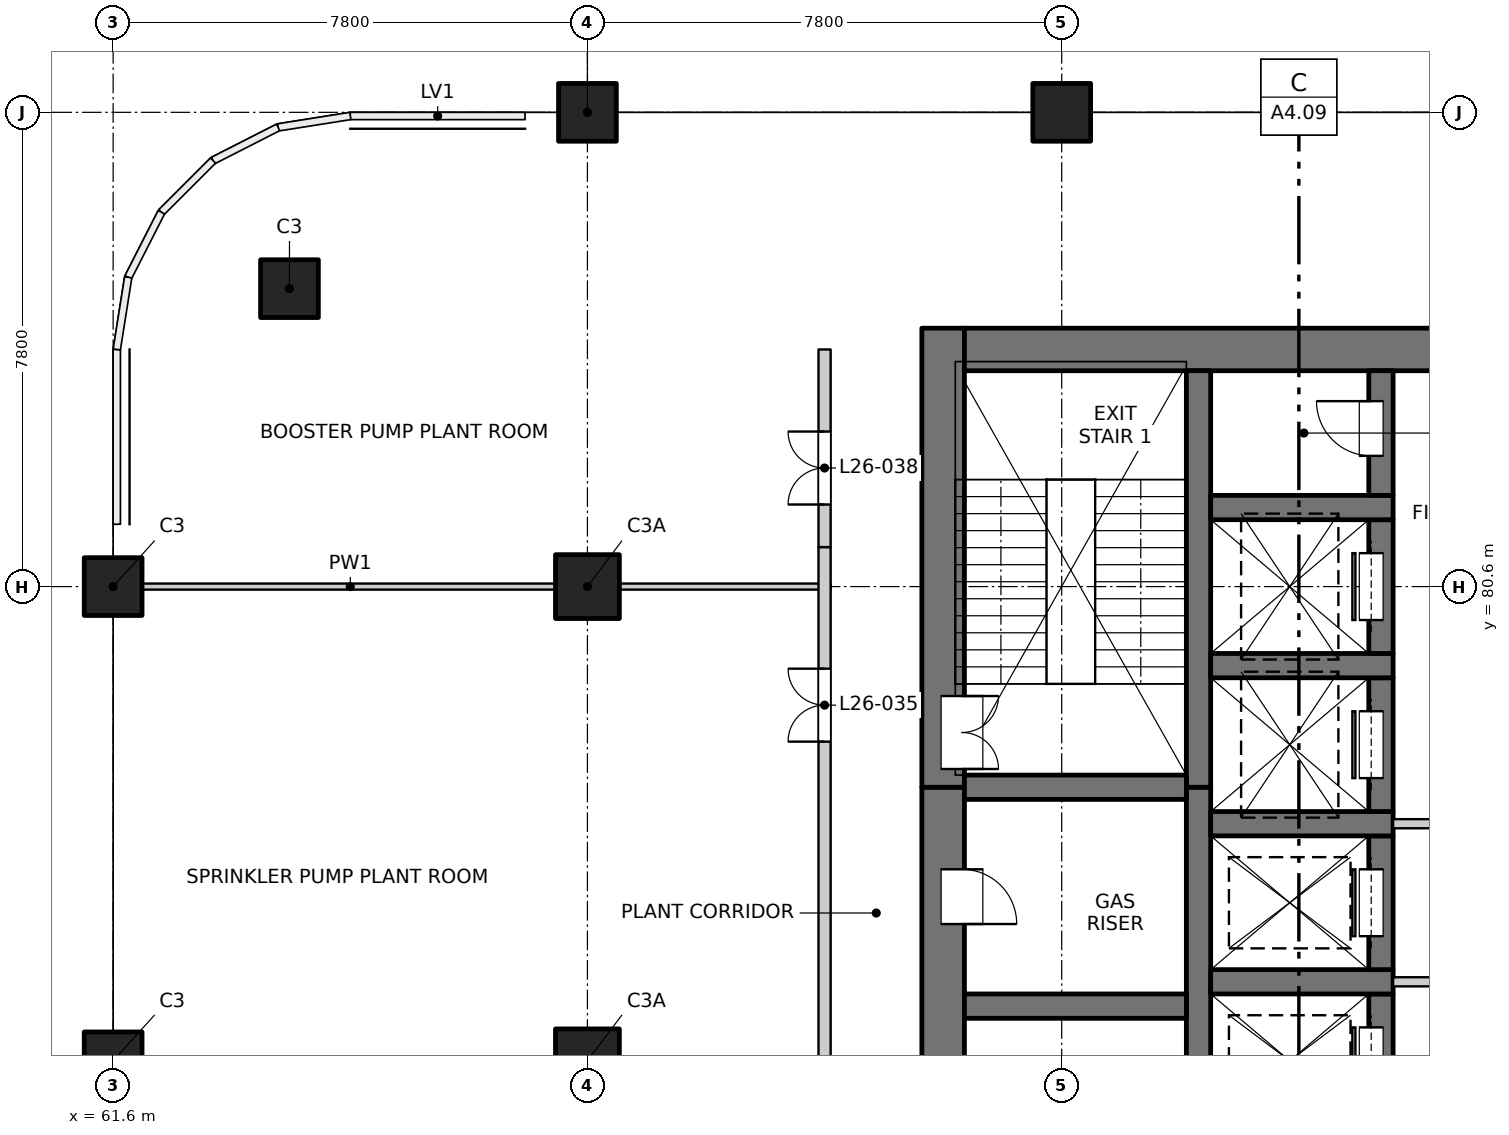
"""IFC4 building model, lengths in metres.
Left out: names, types, materials, properties, quantities, classifications, styles, units other than length and angle.
Written with IfcOpenShell. Run it as: python <this file> out.ifc"""

import sys

from ifc_helpers import new_model, si_unit, direction, frame, frame_2d, origin, origin_2d, place, context, subcontext, project, spatial, rectangle, extrude, element, fill, save


model = new_model("IFC4")
c1 = context("Model", 3, precision=1e-05, world=origin(), true_north=direction((0.0, 1.0)))
c2 = subcontext(c1, "Body", "Model", "MODEL_VIEW")
j1 = project(units=[si_unit("LENGTHUNIT", "METRE"), si_unit("PLANEANGLEUNIT", "RADIAN")], contexts=[c1])
p1 = place(None, origin())
s1 = spatial("IfcSite", under=j1, at=p1, CompositionType="ELEMENT")
p2 = place(p1, origin())
s2 = spatial("IfcBuilding", under=s1, at=p2, CompositionType="ELEMENT")
p3 = place(p2, frame((0.0, 0.0, 95.4)))
s3 = spatial("IfcBuildingStorey", under=s2, at=p3, CompositionType="ELEMENT", Elevation=95.4)
for number, where, z_axis, x_axis in (
    (1, (64.5, 85.5, -0.3), (0.0, 0.0, 1.0), (1.0, 0.0, 0.0)),
    (2, (69.4, 88.4, -0.3), (0.0, 0.0, 1.0), (1.0, 0.0, 0.0)),
    (3, (77.2, 88.4, -0.3), (0.0, 0.0, 1.0), (1.0, 0.0, 0.0)),
    (4, (61.6, 72.8, -0.3), (0.0, 0.0, 1.0), (1.0, 0.0, 0.0)),
    (5, (61.6, 80.6, -0.3), (0.0, 0.0, 1.0), (1.0, 0.0, 0.0)),
):
    element("IfcColumn", number, at=place(p3, frame(where, z_axis=z_axis, x_axis=x_axis)), inside=s3, PredefinedType="COLUMN", context=c2, shape_type="SweptSolid", body=[
        extrude(rectangle(XDim=0.95, YDim=0.95, at=origin_2d()), origin(), (0.0, 0.0, 1.0), 2.9),
    ])
for number, where, z_axis, x_axis in (
    (6, (69.4, 72.8, -0.3), (0.0, 0.0, 1.0), (1.0, 0.0, 0.0)),
    (7, (69.4, 80.6, -0.3), (0.0, 0.0, 1.0), (1.0, 0.0, 0.0)),
):
    element("IfcColumn", number, at=place(p3, frame(where, z_axis=z_axis, x_axis=x_axis)), inside=s3, PredefinedType="COLUMN", context=c2, shape_type="SweptSolid", body=[
        extrude(rectangle(XDim=1.05, YDim=1.05, at=origin_2d()), origin(), (0.0, 0.0, 1.0), 2.9),
    ])
p4 = place(p3, frame((75.25, 54.9, -0.3), z_axis=(0.0, 0.0, 1.0), x_axis=(0.0, 1.0, 0.0)))
e8 = element("IfcWall", 8, at=p4, inside=s3, PredefinedType="SOLIDWALL", context=c2, shape_type="SweptSolid", body=[
    extrude(rectangle(XDim=22.4, YDim=0.7, at=frame_2d((11.2, 0.0))), origin(), (0.0, 0.0, 1.0), 4.5),
])
p5 = place(p4, frame((7.55, 0.0, 0.3)))
e9 = element("IfcOpeningElement", 9, at=p5, cuts=e8, PredefinedType="OPENING", context=c2, shape_type="SweptSolid", body=[
    extrude(rectangle(XDim=0.9, YDim=2.1, at=frame_2d((0.45, 1.05))), frame((0.0, 0.36, 0.0), z_axis=(0.0, -1.0, 0.0), x_axis=(1.0, 0.0, 0.0)), (0.0, 0.0, 1.0), 0.72),
])
p6 = place(p4, frame((10.85, 0.0, 0.3)))
e10 = element("IfcOpeningElement", 10, at=p6, cuts=e8, PredefinedType="OPENING", context=c2, shape_type="SweptSolid", body=[
    extrude(rectangle(XDim=0.9, YDim=2.1, at=frame_2d((0.45, 1.05))), frame((0.0, 0.36, 0.0), z_axis=(0.0, -1.0, 0.0), x_axis=(1.0, 0.0, 0.0)), (0.0, 0.0, 1.0), 0.72),
])
p7 = place(p4, frame((15.35, 0.0, 0.3)))
e11 = element("IfcOpeningElement", 11, at=p7, cuts=e8, PredefinedType="OPENING", context=c2, shape_type="SweptSolid", body=[
    extrude(rectangle(XDim=0.9, YDim=2.1, at=frame_2d((0.45, 1.05))), frame((0.0, 0.36, 0.0), z_axis=(0.0, -1.0, 0.0), x_axis=(1.0, 0.0, 0.0)), (0.0, 0.0, 1.0), 0.72),
])
p8 = place(p4, frame((20.15, 0.0, 0.3)))
e12 = element("IfcOpeningElement", 12, at=p8, cuts=e8, PredefinedType="OPENING", context=c2, shape_type="SweptSolid", body=[
    extrude(rectangle(XDim=0.9, YDim=2.1, at=frame_2d((0.45, 1.05))), frame((0.0, 0.36, 0.0), z_axis=(0.0, -1.0, 0.0), x_axis=(1.0, 0.0, 0.0)), (0.0, 0.0, 1.0), 0.72),
])
p9 = place(p3, frame((75.25, 77.3, -0.3), z_axis=(0.0, 0.0, 1.0), x_axis=(0.0, 1.0, 0.0)))
e13 = element("IfcWall", 13, at=p9, inside=s3, PredefinedType="SOLIDWALL", context=c2, shape_type="SweptSolid", body=[
    extrude(rectangle(XDim=7.55, YDim=0.7, at=frame_2d((3.775, 0.0))), origin(), (0.0, 0.0, 1.0), 4.5),
])
p10 = place(p9, frame((0.3, 0.0, 0.3)))
e14 = element("IfcOpeningElement", 14, at=p10, cuts=e13, PredefinedType="OPENING", context=c2, shape_type="SweptSolid", body=[
    extrude(rectangle(XDim=1.2, YDim=2.1, at=frame_2d((0.6, 1.05))), frame((0.0, 0.36, 0.0), z_axis=(0.0, -1.0, 0.0), x_axis=(1.0, 0.0, 0.0)), (0.0, 0.0, 1.0), 0.72),
])
p11 = place(p3, frame((75.6, 84.5, -0.3), z_axis=(0.0, 0.0, 1.0), x_axis=(1.0, 0.0, 0.0)))
e15 = element("IfcWall", 15, at=p11, inside=s3, PredefinedType="SOLIDWALL", context=c2, shape_type="SweptSolid", body=[
    extrude(rectangle(XDim=18.8, YDim=0.7, at=frame_2d((9.4, 0.0))), origin(), (0.0, 0.0, 1.0), 4.5),
])
p12 = place(p3, frame((79.45, 60.9, -0.3), z_axis=(0.0, 0.0, 1.0), x_axis=(0.0, 1.0, 0.0)))
e16 = element("IfcWall", 16, at=p12, inside=s3, PredefinedType="SOLIDWALL", context=c2, shape_type="SweptSolid", body=[
    extrude(rectangle(XDim=16.4, YDim=0.4, at=frame_2d((8.2, 0.0))), origin(), (0.0, 0.0, 1.0), 4.5),
])
p13 = place(p3, frame((79.45, 77.3, -0.3), z_axis=(0.0, 0.0, 1.0), x_axis=(0.0, 1.0, 0.0)))
e17 = element("IfcWall", 17, at=p13, inside=s3, PredefinedType="SOLIDWALL", context=c2, shape_type="SweptSolid", body=[
    extrude(rectangle(XDim=6.85, YDim=0.4, at=frame_2d((3.425, 0.0))), origin(), (0.0, 0.0, 1.0), 4.5),
])
p14 = place(p3, frame((82.45, 71.7, -0.3), z_axis=(0.0, 0.0, 1.0), x_axis=(0.0, 1.0, 0.0)))
e18 = element("IfcWall", 18, at=p14, inside=s3, PredefinedType="SOLIDWALL", context=c2, shape_type="SweptSolid", body=[
    extrude(rectangle(XDim=2.2, YDim=0.4, at=frame_2d((1.1, 0.0))), origin(), (0.0, 0.0, 1.0), 4.5),
])
p15 = place(p14, frame((0.55, 0.0, 0.3)))
e19 = element("IfcOpeningElement", 19, at=p15, cuts=e18, PredefinedType="OPENING", context=c2, shape_type="SweptSolid", body=[
    extrude(rectangle(XDim=1.1, YDim=2.1, at=frame_2d((0.55, 1.05))), frame((0.0, 0.21, 0.0), z_axis=(0.0, -1.0, 0.0), x_axis=(1.0, 0.0, 0.0)), (0.0, 0.0, 1.0), 0.42),
])
p16 = place(p3, frame((79.65, 74.1, -0.3), z_axis=(0.0, 0.0, 1.0), x_axis=(1.0, 0.0, 0.0)))
e20 = element("IfcWall", 20, at=p16, inside=s3, PredefinedType="SOLIDWALL", context=c2, shape_type="SweptSolid", body=[
    extrude(rectangle(XDim=3.0, YDim=0.4, at=frame_2d((1.5, 0.0))), origin(), (0.0, 0.0, 1.0), 4.5),
])
p17 = place(p3, frame((82.45, 74.3, -0.3), z_axis=(0.0, 0.0, 1.0), x_axis=(0.0, 1.0, 0.0)))
e21 = element("IfcWall", 21, at=p17, inside=s3, PredefinedType="SOLIDWALL", context=c2, shape_type="SweptSolid", body=[
    extrude(rectangle(XDim=2.2, YDim=0.4, at=frame_2d((1.1, 0.0))), origin(), (0.0, 0.0, 1.0), 4.5),
])
p18 = place(p17, frame((0.55, 0.0, 0.3)))
e22 = element("IfcOpeningElement", 22, at=p18, cuts=e21, PredefinedType="OPENING", context=c2, shape_type="SweptSolid", body=[
    extrude(rectangle(XDim=1.1, YDim=2.1, at=frame_2d((0.55, 1.05))), frame((0.0, 0.21, 0.0), z_axis=(0.0, -1.0, 0.0), x_axis=(1.0, 0.0, 0.0)), (0.0, 0.0, 1.0), 0.42),
])
p19 = place(p3, frame((79.65, 76.7, -0.3), z_axis=(0.0, 0.0, 1.0), x_axis=(1.0, 0.0, 0.0)))
e23 = element("IfcWall", 23, at=p19, inside=s3, PredefinedType="SOLIDWALL", context=c2, shape_type="SweptSolid", body=[
    extrude(rectangle(XDim=3.0, YDim=0.4, at=frame_2d((1.5, 0.0))), origin(), (0.0, 0.0, 1.0), 4.5),
])
p20 = place(p3, frame((82.45, 76.9, -0.3), z_axis=(0.0, 0.0, 1.0), x_axis=(0.0, 1.0, 0.0)))
e24 = element("IfcWall", 24, at=p20, inside=s3, PredefinedType="SOLIDWALL", context=c2, shape_type="SweptSolid", body=[
    extrude(rectangle(XDim=2.2, YDim=0.4, at=frame_2d((1.1, 0.0))), origin(), (0.0, 0.0, 1.0), 4.5),
])
p21 = place(p20, frame((0.55, 0.0, 0.3)))
e25 = element("IfcOpeningElement", 25, at=p21, cuts=e24, PredefinedType="OPENING", context=c2, shape_type="SweptSolid", body=[
    extrude(rectangle(XDim=1.1, YDim=2.1, at=frame_2d((0.55, 1.05))), frame((0.0, 0.21, 0.0), z_axis=(0.0, -1.0, 0.0), x_axis=(1.0, 0.0, 0.0)), (0.0, 0.0, 1.0), 0.42),
])
p22 = place(p3, frame((79.65, 79.3, -0.3), z_axis=(0.0, 0.0, 1.0), x_axis=(1.0, 0.0, 0.0)))
e26 = element("IfcWall", 26, at=p22, inside=s3, PredefinedType="SOLIDWALL", context=c2, shape_type="SweptSolid", body=[
    extrude(rectangle(XDim=3.0, YDim=0.4, at=frame_2d((1.5, 0.0))), origin(), (0.0, 0.0, 1.0), 4.5),
])
p23 = place(p3, frame((82.45, 79.5, -0.3), z_axis=(0.0, 0.0, 1.0), x_axis=(0.0, 1.0, 0.0)))
e27 = element("IfcWall", 27, at=p23, inside=s3, PredefinedType="SOLIDWALL", context=c2, shape_type="SweptSolid", body=[
    extrude(rectangle(XDim=2.2, YDim=0.4, at=frame_2d((1.1, 0.0))), origin(), (0.0, 0.0, 1.0), 4.5),
])
p24 = place(p23, frame((0.55, 0.0, 0.3)))
e28 = element("IfcOpeningElement", 28, at=p24, cuts=e27, PredefinedType="OPENING", context=c2, shape_type="SweptSolid", body=[
    extrude(rectangle(XDim=1.1, YDim=2.1, at=frame_2d((0.55, 1.05))), frame((0.0, 0.21, 0.0), z_axis=(0.0, -1.0, 0.0), x_axis=(1.0, 0.0, 0.0)), (0.0, 0.0, 1.0), 0.42),
])
p25 = place(p3, frame((79.65, 81.9, -0.3), z_axis=(0.0, 0.0, 1.0), x_axis=(1.0, 0.0, 0.0)))
e29 = element("IfcWall", 29, at=p25, inside=s3, PredefinedType="SOLIDWALL", context=c2, shape_type="SweptSolid", body=[
    extrude(rectangle(XDim=3.0, YDim=0.4, at=frame_2d((1.5, 0.0))), origin(), (0.0, 0.0, 1.0), 4.5),
])
p26 = place(p3, frame((82.45, 82.1, -0.3), z_axis=(0.0, 0.0, 1.0), x_axis=(0.0, 1.0, 0.0)))
e30 = element("IfcWall", 30, at=p26, inside=s3, PredefinedType="SOLIDWALL", context=c2, shape_type="SweptSolid", body=[
    extrude(rectangle(XDim=2.05, YDim=0.4, at=frame_2d((1.025, 0.0))), origin(), (0.0, 0.0, 1.0), 4.5),
])
p27 = place(p26, frame((0.65, 0.0, 0.3)))
e31 = element("IfcOpeningElement", 31, at=p27, cuts=e30, PredefinedType="OPENING", context=c2, shape_type="SweptSolid", body=[
    extrude(rectangle(XDim=0.9, YDim=2.1, at=frame_2d((0.45, 1.05))), frame((0.0, 0.21, 0.0), z_axis=(0.0, -1.0, 0.0), x_axis=(1.0, 0.0, 0.0)), (0.0, 0.0, 1.0), 0.42),
])
for number, where, z_axis, x_axis in (
    (32, (75.6, 73.7, -0.3), (0.0, 0.0, 1.0), (1.0, 0.0, 0.0)),
    (33, (75.6, 77.3, -0.3), (0.0, 0.0, 1.0), (1.0, 0.0, 0.0)),
):
    element("IfcWall", number, at=place(p3, frame(where, z_axis=z_axis, x_axis=x_axis)), inside=s3, PredefinedType="SOLIDWALL", context=c2, shape_type="SweptSolid", body=[
        extrude(rectangle(XDim=3.65, YDim=0.4, at=frame_2d((1.825, 0.0))), origin(), (0.0, 0.0, 1.0), 4.5),
    ])
p28 = place(p3, frame((82.65, 74.1, 0.0), z_axis=(0.0, 0.0, 1.0), x_axis=(1.0, 0.0, 0.0)))
e34 = element("IfcWall", 34, at=p28, inside=s3, PredefinedType="PARTITIONING", context=c2, shape_type="SweptSolid", body=[
    extrude(rectangle(XDim=4.7, YDim=0.15, at=frame_2d((2.35, 0.0))), origin(), (0.0, 0.0, 1.0), 4.2),
])
p29 = place(p28, frame((1.45, 0.0, 0.0)))
e35 = element("IfcOpeningElement", 35, at=p29, cuts=e34, PredefinedType="OPENING", context=c2, shape_type="SweptSolid", body=[
    extrude(rectangle(XDim=1.8, YDim=2.1, at=frame_2d((0.9, 1.05))), frame((0.0, 0.085, 0.0), z_axis=(0.0, -1.0, 0.0), x_axis=(1.0, 0.0, 0.0)), (0.0, 0.0, 1.0), 0.17),
])
p30 = place(p3, frame((82.65, 76.7, 0.0), z_axis=(0.0, 0.0, 1.0), x_axis=(1.0, 0.0, 0.0)))
e36 = element("IfcWall", 36, at=p30, inside=s3, PredefinedType="PARTITIONING", context=c2, shape_type="SweptSolid", body=[
    extrude(rectangle(XDim=4.7, YDim=0.15, at=frame_2d((2.35, 0.0))), origin(), (0.0, 0.0, 1.0), 4.2),
])
p31 = place(p30, frame((1.45, 0.0, 0.0)))
e37 = element("IfcOpeningElement", 37, at=p31, cuts=e36, PredefinedType="OPENING", context=c2, shape_type="SweptSolid", body=[
    extrude(rectangle(XDim=1.8, YDim=2.1, at=frame_2d((0.9, 1.05))), frame((0.0, 0.085, 0.0), z_axis=(0.0, -1.0, 0.0), x_axis=(1.0, 0.0, 0.0)), (0.0, 0.0, 1.0), 0.17),
])
p32 = place(p3, frame((61.6, 80.6, 0.0), z_axis=(0.0, 0.0, 1.0), x_axis=(1.0, 0.0, 0.0)))
e38 = element("IfcWall", 38, at=p32, inside=s3, PredefinedType="PARTITIONING", context=c2, shape_type="SweptSolid", body=[
    extrude(rectangle(XDim=7.8, YDim=0.1, at=frame_2d((3.9, 0.0))), origin(), (0.0, 0.0, 1.0), 4.2),
])
p33 = place(p3, frame((69.4, 80.6, 0.0), z_axis=(0.0, 0.0, 1.0), x_axis=(1.0, 0.0, 0.0)))
e39 = element("IfcWall", 39, at=p33, inside=s3, PredefinedType="PARTITIONING", context=c2, shape_type="SweptSolid", body=[
    extrude(rectangle(XDim=4.0, YDim=0.1, at=frame_2d((2.0, 0.0))), origin(), (0.0, 0.0, 1.0), 2.6),
])
p34 = place(p3, frame((73.3, 55.35, 0.0), z_axis=(0.0, 0.0, 1.0), x_axis=(0.0, 1.0, 0.0)))
e40 = element("IfcWall", 40, at=p34, inside=s3, PredefinedType="PARTITIONING", context=c2, shape_type="SweptSolid", body=[
    extrude(rectangle(XDim=25.9, YDim=0.2, at=frame_2d((12.95, 0.0))), origin(), (0.0, 0.0, 1.0), 4.2),
])
p35 = place(p34, frame((0.35, 0.0, 0.0)))
e41 = element("IfcOpeningElement", 41, at=p35, cuts=e40, PredefinedType="OPENING", context=c2, shape_type="SweptSolid", body=[
    extrude(rectangle(XDim=1.2, YDim=2.1, at=frame_2d((0.6, 1.05))), frame((0.0, 0.11, 0.0), z_axis=(0.0, -1.0, 0.0), x_axis=(1.0, 0.0, 0.0)), (0.0, 0.0, 1.0), 0.22),
])
p36 = place(p34, frame((3.2, 0.0, 0.0)))
e42 = element("IfcOpeningElement", 42, at=p36, cuts=e40, PredefinedType="OPENING", context=c2, shape_type="SweptSolid", body=[
    extrude(rectangle(XDim=1.2, YDim=2.1, at=frame_2d((0.6, 1.05))), frame((0.0, 0.11, 0.0), z_axis=(0.0, -1.0, 0.0), x_axis=(1.0, 0.0, 0.0)), (0.0, 0.0, 1.0), 0.22),
])
p37 = place(p34, frame((22.7, 0.0, 0.0)))
e43 = element("IfcOpeningElement", 43, at=p37, cuts=e40, PredefinedType="OPENING", context=c2, shape_type="SweptSolid", body=[
    extrude(rectangle(XDim=1.2, YDim=2.1, at=frame_2d((0.6, 1.05))), frame((0.0, 0.11, 0.0), z_axis=(0.0, -1.0, 0.0), x_axis=(1.0, 0.0, 0.0)), (0.0, 0.0, 1.0), 0.22),
])
p38 = place(p3, frame((73.3, 81.25, 0.0), z_axis=(0.0, 0.0, 1.0), x_axis=(0.0, 1.0, 0.0)))
e44 = element("IfcWall", 44, at=p38, inside=s3, PredefinedType="PARTITIONING", context=c2, shape_type="SweptSolid", body=[
    extrude(rectangle(XDim=3.25, YDim=0.2, at=frame_2d((1.625, 0.0))), origin(), (0.0, 0.0, 1.0), 2.6),
])
p39 = place(p38, frame((0.7, 0.0, 0.0)))
e45 = element("IfcOpeningElement", 45, at=p39, cuts=e44, PredefinedType="OPENING", context=c2, shape_type="SweptSolid", body=[
    extrude(rectangle(XDim=1.2, YDim=2.1, at=frame_2d((0.6, 1.05))), frame((0.0, 0.11, 0.0), z_axis=(0.0, -1.0, 0.0), x_axis=(1.0, 0.0, 0.0)), (0.0, 0.0, 1.0), 0.22),
])
p40 = place(p15, origin())
e46 = element("IfcDoor", 46, at=p40, inside=s3, OperationType="SLIDING_TO_LEFT", PredefinedType="DOOR", context=c2, shape_type="SweptSolid", body=[
    extrude(rectangle(XDim=1.1, YDim=2.1, at=frame_2d((0.55, 1.05))), frame((0.0, 0.185, 0.0), z_axis=(0.0, -1.0, 0.0), x_axis=(1.0, 0.0, 0.0)), (0.0, 0.0, 1.0), 0.05),
])
fill(e19, e46)
p41 = place(p18, origin())
e47 = element("IfcDoor", 47, at=p41, inside=s3, OperationType="SLIDING_TO_LEFT", PredefinedType="DOOR", context=c2, shape_type="SweptSolid", body=[
    extrude(rectangle(XDim=1.1, YDim=2.1, at=frame_2d((0.55, 1.05))), frame((0.0, 0.185, 0.0), z_axis=(0.0, -1.0, 0.0), x_axis=(1.0, 0.0, 0.0)), (0.0, 0.0, 1.0), 0.05),
])
fill(e22, e47)
p42 = place(p8, origin())
e48 = element("IfcDoor", 48, at=p42, inside=s3, OperationType="SINGLE_SWING_RIGHT", PredefinedType="DOOR", context=c2, shape_type="SweptSolid", body=[
    extrude(rectangle(XDim=0.9, YDim=2.1, at=frame_2d((0.45, 1.05))), frame((0.0, -0.285, 0.0), z_axis=(0.0, -1.0, 0.0), x_axis=(1.0, 0.0, 0.0)), (0.0, 0.0, 1.0), 0.05),
])
fill(e12, e48)
p43 = place(p21, origin())
e49 = element("IfcDoor", 49, at=p43, inside=s3, OperationType="SLIDING_TO_LEFT", PredefinedType="DOOR", context=c2, shape_type="SweptSolid", body=[
    extrude(rectangle(XDim=1.1, YDim=2.1, at=frame_2d((0.55, 1.05))), frame((0.0, 0.185, 0.0), z_axis=(0.0, -1.0, 0.0), x_axis=(1.0, 0.0, 0.0)), (0.0, 0.0, 1.0), 0.05),
])
fill(e25, e49)
p44 = place(p10, origin())
e50 = element("IfcDoor", 50, at=p44, inside=s3, OperationType="DOUBLE_DOOR_SINGLE_SWING", PredefinedType="DOOR", context=c2, shape_type="SweptSolid", body=[
    extrude(rectangle(XDim=1.2, YDim=2.1, at=frame_2d((0.6, 1.05))), frame((0.0, -0.285, 0.0), z_axis=(0.0, -1.0, 0.0), x_axis=(1.0, 0.0, 0.0)), (0.0, 0.0, 1.0), 0.05),
])
fill(e14, e50)
p45 = place(p37, origin())
e51 = element("IfcDoor", 51, at=p45, inside=s3, OperationType="DOUBLE_DOOR_SINGLE_SWING", PredefinedType="DOOR", context=c2, shape_type="SweptSolid", body=[
    extrude(rectangle(XDim=1.2, YDim=2.1, at=frame_2d((0.6, 1.05))), frame((0.0, 0.025, 0.0), z_axis=(0.0, -1.0, 0.0), x_axis=(1.0, 0.0, 0.0)), (0.0, 0.0, 1.0), 0.05),
])
fill(e43, e51)
p46 = place(p24, origin())
e52 = element("IfcDoor", 52, at=p46, inside=s3, OperationType="SLIDING_TO_LEFT", PredefinedType="DOOR", context=c2, shape_type="SweptSolid", body=[
    extrude(rectangle(XDim=1.1, YDim=2.1, at=frame_2d((0.55, 1.05))), frame((0.0, 0.185, 0.0), z_axis=(0.0, -1.0, 0.0), x_axis=(1.0, 0.0, 0.0)), (0.0, 0.0, 1.0), 0.05),
])
fill(e28, e52)
p47 = place(p39, origin())
e53 = element("IfcDoor", 53, at=p47, inside=s3, OperationType="DOUBLE_DOOR_SINGLE_SWING", PredefinedType="DOOR", context=c2, shape_type="SweptSolid", body=[
    extrude(rectangle(XDim=1.2, YDim=2.1, at=frame_2d((0.6, 1.05))), frame((0.0, 0.025, 0.0), z_axis=(0.0, -1.0, 0.0), x_axis=(1.0, 0.0, 0.0)), (0.0, 0.0, 1.0), 0.05),
])
fill(e45, e53)
p48 = place(p27, origin())
e54 = element("IfcDoor", 54, at=p48, inside=s3, OperationType="SINGLE_SWING_RIGHT", PredefinedType="DOOR", context=c2, shape_type="SweptSolid", body=[
    extrude(rectangle(XDim=0.9, YDim=2.1, at=frame_2d((0.45, 1.05))), frame((0.0, 0.185, 0.0), z_axis=(0.0, -1.0, 0.0), x_axis=(1.0, 0.0, 0.0)), (0.0, 0.0, 1.0), 0.05),
])
fill(e31, e54)
save(model, sys.argv[1])
